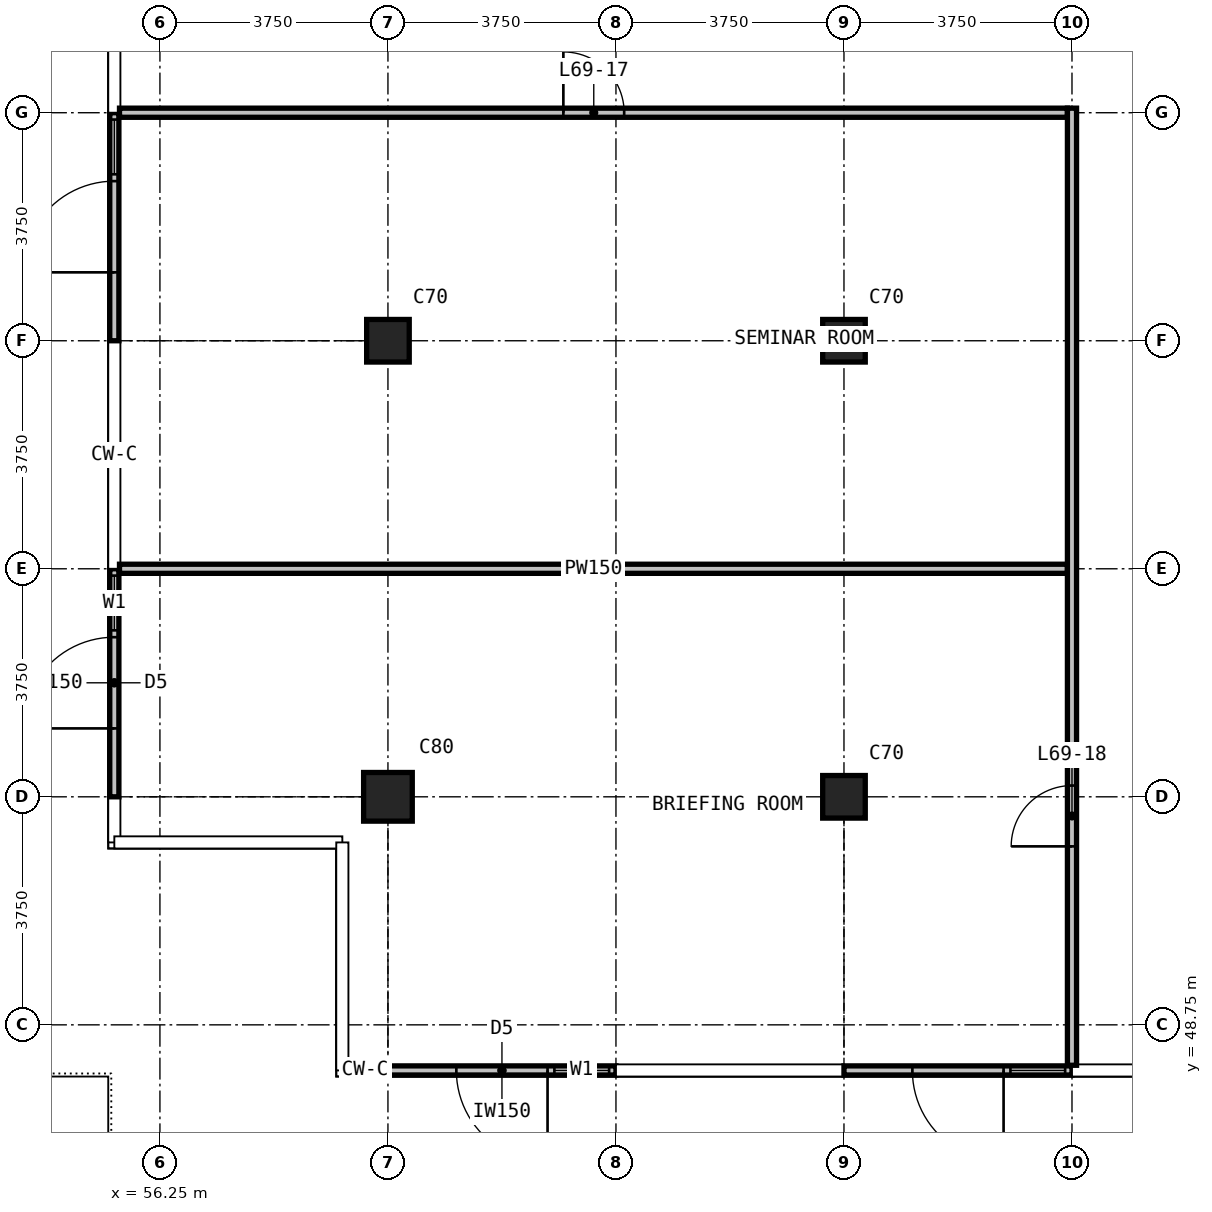
"""IFC4 building model, lengths in metres.
Left out: names, types, materials, properties, quantities, classifications, styles, units other than length and angle.
Written with IfcOpenShell. Run it as: python <this file> out.ifc"""

import sys

from ifc_helpers import new_model, si_unit, direction, frame, frame_2d, origin, origin_2d, place, context, subcontext, project, spatial, rectangle, extrude, element, fill, save


model = new_model("IFC4")
c1 = context("Model", 3, precision=1e-05, world=origin(), true_north=direction((0.0, 1.0)))
c2 = subcontext(c1, "Body", "Model", "MODEL_VIEW")
j1 = project(units=[si_unit("LENGTHUNIT", "METRE"), si_unit("PLANEANGLEUNIT", "RADIAN")], contexts=[c1])
p1 = place(None, origin())
s1 = spatial("IfcSite", under=j1, at=p1, CompositionType="ELEMENT")
p2 = place(p1, origin())
s2 = spatial("IfcBuilding", under=s1, at=p2, CompositionType="ELEMENT")
p3 = place(p2, frame((0.0, 0.0, 265.7)))
s3 = spatial("IfcBuildingStorey", under=s2, at=p3, CompositionType="ELEMENT", Elevation=265.7)
p4 = place(p3, frame((60.0, 52.5, 0.0), z_axis=(0.0, 0.0, 1.0), x_axis=(1.0, 0.0, 0.0)))
e1 = element("IfcColumn", 1, at=p4, inside=s3, PredefinedType="COLUMN", context=c2, shape_type="SweptSolid", body=[
    extrude(rectangle(XDim=0.8, YDim=0.8, at=origin_2d()), origin(), (0.0, 0.0, 1.0), 3.6),
])
for number, where, z_axis, x_axis in (
    (2, (60.0, 60.0, 0.0), (0.0, 0.0, 1.0), (1.0, 0.0, 0.0)),
    (3, (67.5, 52.5, 0.0), (0.0, 0.0, 1.0), (1.0, 0.0, 0.0)),
    (4, (67.5, 60.0, 0.0), (0.0, 0.0, 1.0), (1.0, 0.0, 0.0)),
):
    element("IfcColumn", number, at=place(p3, frame(where, z_axis=z_axis, x_axis=x_axis)), inside=s3, PredefinedType="COLUMN", context=c2, shape_type="SweptSolid", body=[
        extrude(rectangle(XDim=0.7, YDim=0.7, at=origin_2d()), origin(), (0.0, 0.0, 1.0), 3.6),
    ])
p5 = place(p3, frame((55.5, 52.5, 0.0), z_axis=(0.0, 0.0, 1.0), x_axis=(0.0, 1.0, 0.0)))
e5 = element("IfcWall", 5, at=p5, inside=s3, PredefinedType="SOLIDWALL", context=c2, shape_type="SweptSolid", body=[
    extrude(rectangle(XDim=3.75, YDim=0.15, at=frame_2d((1.875, 0.0))), origin(), (0.0, 0.0, 1.0), 3.3),
])
p6 = place(p5, frame((1.125, 0.0, 0.0)))
e6 = element("IfcOpeningElement", 6, at=p6, cuts=e5, PredefinedType="OPENING", context=c2, shape_type="SweptSolid", body=[
    extrude(rectangle(XDim=1.5, YDim=2.4, at=frame_2d((0.75, 1.2))), frame((0.0, 0.085, 0.0), z_axis=(0.0, -1.0, 0.0), x_axis=(1.0, 0.0, 0.0)), (0.0, 0.0, 1.0), 0.17),
])
p7 = place(p5, frame((2.738, 0.0, 0.1)))
e7 = element("IfcOpeningElement", 7, at=p7, cuts=e5, PredefinedType="OPENING", context=c2, shape_type="SweptSolid", body=[
    extrude(rectangle(XDim=0.9, YDim=2.4, at=frame_2d((0.45, 1.2))), frame((0.0, 0.085, 0.0), z_axis=(0.0, -1.0, 0.0), x_axis=(1.0, 0.0, 0.0)), (0.0, 0.0, 1.0), 0.17),
])
p8 = place(p3, frame((55.5, 60.0, 0.0), z_axis=(0.0, 0.0, 1.0), x_axis=(0.0, 1.0, 0.0)))
e8 = element("IfcWall", 8, at=p8, inside=s3, PredefinedType="SOLIDWALL", context=c2, shape_type="SweptSolid", body=[
    extrude(rectangle(XDim=3.75, YDim=0.15, at=frame_2d((1.875, 0.0))), origin(), (0.0, 0.0, 1.0), 3.3),
])
p9 = place(p8, frame((1.125, 0.0, 0.0)))
e9 = element("IfcOpeningElement", 9, at=p9, cuts=e8, PredefinedType="OPENING", context=c2, shape_type="SweptSolid", body=[
    extrude(rectangle(XDim=1.5, YDim=2.4, at=frame_2d((0.75, 1.2))), frame((0.0, 0.085, 0.0), z_axis=(0.0, -1.0, 0.0), x_axis=(1.0, 0.0, 0.0)), (0.0, 0.0, 1.0), 0.17),
])
p10 = place(p8, frame((2.738, 0.0, 0.1)))
e10 = element("IfcOpeningElement", 10, at=p10, cuts=e8, PredefinedType="OPENING", context=c2, shape_type="SweptSolid", body=[
    extrude(rectangle(XDim=0.9, YDim=2.4, at=frame_2d((0.45, 1.2))), frame((0.0, 0.085, 0.0), z_axis=(0.0, -1.0, 0.0), x_axis=(1.0, 0.0, 0.0)), (0.0, 0.0, 1.0), 0.17),
])
p11 = place(p3, frame((63.75, 48.0, 0.0), z_axis=(0.0, 0.0, 1.0), x_axis=(-1.0, 0.0, 0.0)))
e11 = element("IfcWall", 11, at=p11, inside=s3, PredefinedType="SOLIDWALL", context=c2, shape_type="SweptSolid", body=[
    extrude(rectangle(XDim=3.75, YDim=0.15, at=frame_2d((1.875, 0.0))), origin(), (0.0, 0.0, 1.0), 3.3),
])
p12 = place(p11, frame((0.113, 0.0, 0.1)))
e12 = element("IfcOpeningElement", 12, at=p12, cuts=e11, PredefinedType="OPENING", context=c2, shape_type="SweptSolid", body=[
    extrude(rectangle(XDim=0.9, YDim=2.4, at=frame_2d((0.45, 1.2))), frame((0.0, 0.085, 0.0), z_axis=(0.0, -1.0, 0.0), x_axis=(1.0, 0.0, 0.0)), (0.0, 0.0, 1.0), 0.17),
])
p13 = place(p11, frame((1.125, 0.0, 0.0)))
e13 = element("IfcOpeningElement", 13, at=p13, cuts=e11, PredefinedType="OPENING", context=c2, shape_type="SweptSolid", body=[
    extrude(rectangle(XDim=1.5, YDim=2.4, at=frame_2d((0.75, 1.2))), frame((0.0, 0.085, 0.0), z_axis=(0.0, -1.0, 0.0), x_axis=(1.0, 0.0, 0.0)), (0.0, 0.0, 1.0), 0.17),
])
p14 = place(p3, frame((71.25, 48.0, 0.0), z_axis=(0.0, 0.0, 1.0), x_axis=(-1.0, 0.0, 0.0)))
e14 = element("IfcWall", 14, at=p14, inside=s3, PredefinedType="SOLIDWALL", context=c2, shape_type="SweptSolid", body=[
    extrude(rectangle(XDim=3.75, YDim=0.15, at=frame_2d((1.875, 0.0))), origin(), (0.0, 0.0, 1.0), 3.3),
])
p15 = place(p14, frame((0.113, 0.0, 0.1)))
e15 = element("IfcOpeningElement", 15, at=p15, cuts=e14, PredefinedType="OPENING", context=c2, shape_type="SweptSolid", body=[
    extrude(rectangle(XDim=0.9, YDim=2.4, at=frame_2d((0.45, 1.2))), frame((0.0, 0.085, 0.0), z_axis=(0.0, -1.0, 0.0), x_axis=(1.0, 0.0, 0.0)), (0.0, 0.0, 1.0), 0.17),
])
p16 = place(p14, frame((1.125, 0.0, 0.0)))
e16 = element("IfcOpeningElement", 16, at=p16, cuts=e14, PredefinedType="OPENING", context=c2, shape_type="SweptSolid", body=[
    extrude(rectangle(XDim=1.5, YDim=2.4, at=frame_2d((0.75, 1.2))), frame((0.0, 0.085, 0.0), z_axis=(0.0, -1.0, 0.0), x_axis=(1.0, 0.0, 0.0)), (0.0, 0.0, 1.0), 0.17),
])
p17 = place(p3, frame((55.585, 56.25, 0.0), z_axis=(0.0, 0.0, 1.0), x_axis=(1.0, 0.0, 0.0)))
e17 = element("IfcWall", 17, at=p17, inside=s3, PredefinedType="PARTITIONING", context=c2, shape_type="SweptSolid", body=[
    extrude(rectangle(XDim=15.59, YDim=0.15, at=frame_2d((7.795, 0.0))), origin(), (0.0, 0.0, 1.0), 3.3),
])
p18 = place(p3, frame((55.585, 63.75, 0.0), z_axis=(0.0, 0.0, 1.0), x_axis=(1.0, 0.0, 0.0)))
e18 = element("IfcWall", 18, at=p18, inside=s3, PredefinedType="PARTITIONING", context=c2, shape_type="SweptSolid", body=[
    extrude(rectangle(XDim=15.59, YDim=0.15, at=frame_2d((7.795, 0.0))), origin(), (0.0, 0.0, 1.0), 3.3),
])
p19 = place(p18, frame((7.3, 0.0, 0.0)))
e19 = element("IfcOpeningElement", 19, at=p19, cuts=e18, PredefinedType="OPENING", context=c2, shape_type="SweptSolid", body=[
    extrude(rectangle(XDim=1.0, YDim=2.2, at=frame_2d((0.5, 1.1))), frame((0.0, 0.085, 0.0), z_axis=(0.0, -1.0, 0.0), x_axis=(1.0, 0.0, 0.0)), (0.0, 0.0, 1.0), 0.17),
])
p20 = place(p3, frame((71.25, 48.085, 0.0), z_axis=(0.0, 0.0, 1.0), x_axis=(0.0, 1.0, 0.0)))
e20 = element("IfcWall", 20, at=p20, inside=s3, PredefinedType="PARTITIONING", context=c2, shape_type="SweptSolid", body=[
    extrude(rectangle(XDim=15.74, YDim=0.15, at=frame_2d((7.87, 0.0))), origin(), (0.0, 0.0, 1.0), 3.3),
])
p21 = place(p20, frame((3.6, 0.0, 0.0)))
e21 = element("IfcOpeningElement", 21, at=p21, cuts=e20, PredefinedType="OPENING", context=c2, shape_type="SweptSolid", body=[
    extrude(rectangle(XDim=1.0, YDim=2.2, at=frame_2d((0.5, 1.1))), frame((0.0, 0.085, 0.0), z_axis=(0.0, -1.0, 0.0), x_axis=(1.0, 0.0, 0.0)), (0.0, 0.0, 1.0), 0.17),
])
p22 = place(p6, origin())
e22 = element("IfcDoor", 22, at=p22, inside=s3, OperationType="DOUBLE_DOOR_SINGLE_SWING", PredefinedType="DOOR", context=c2, shape_type="SweptSolid", body=[
    extrude(rectangle(XDim=1.5, YDim=2.4, at=frame_2d((0.75, 1.2))), frame((0.0, 0.025, 0.0), z_axis=(0.0, -1.0, 0.0), x_axis=(1.0, 0.0, 0.0)), (0.0, 0.0, 1.0), 0.05),
])
fill(e6, e22)
p23 = place(p7, origin())
e23 = element("IfcWindow", 23, at=p23, inside=s3, PartitioningType="SINGLE_PANEL", PredefinedType="WINDOW", context=c2, shape_type="SweptSolid", body=[
    extrude(rectangle(XDim=0.9, YDim=2.4, at=frame_2d((0.45, 1.2))), frame((0.0, 0.03, 0.0), z_axis=(0.0, -1.0, 0.0), x_axis=(1.0, 0.0, 0.0)), (0.0, 0.0, 1.0), 0.06),
])
fill(e7, e23)
p24 = place(p9, origin())
e24 = element("IfcDoor", 24, at=p24, inside=s3, OperationType="DOUBLE_DOOR_SINGLE_SWING", PredefinedType="DOOR", context=c2, shape_type="SweptSolid", body=[
    extrude(rectangle(XDim=1.5, YDim=2.4, at=frame_2d((0.75, 1.2))), frame((0.0, 0.025, 0.0), z_axis=(0.0, -1.0, 0.0), x_axis=(1.0, 0.0, 0.0)), (0.0, 0.0, 1.0), 0.05),
])
fill(e9, e24)
p25 = place(p10, origin())
e25 = element("IfcWindow", 25, at=p25, inside=s3, PartitioningType="SINGLE_PANEL", PredefinedType="WINDOW", context=c2, shape_type="SweptSolid", body=[
    extrude(rectangle(XDim=0.9, YDim=2.4, at=frame_2d((0.45, 1.2))), frame((0.0, 0.03, 0.0), z_axis=(0.0, -1.0, 0.0), x_axis=(1.0, 0.0, 0.0)), (0.0, 0.0, 1.0), 0.06),
])
fill(e10, e25)
p26 = place(p12, origin())
e26 = element("IfcWindow", 26, at=p26, inside=s3, PartitioningType="SINGLE_PANEL", PredefinedType="WINDOW", context=c2, shape_type="SweptSolid", body=[
    extrude(rectangle(XDim=0.9, YDim=2.4, at=frame_2d((0.45, 1.2))), frame((0.0, 0.03, 0.0), z_axis=(0.0, -1.0, 0.0), x_axis=(1.0, 0.0, 0.0)), (0.0, 0.0, 1.0), 0.06),
])
fill(e12, e26)
p27 = place(p13, origin())
e27 = element("IfcDoor", 27, at=p27, inside=s3, OperationType="DOUBLE_DOOR_SINGLE_SWING", PredefinedType="DOOR", context=c2, shape_type="SweptSolid", body=[
    extrude(rectangle(XDim=1.5, YDim=2.4, at=frame_2d((0.75, 1.2))), frame((0.0, 0.025, 0.0), z_axis=(0.0, -1.0, 0.0), x_axis=(1.0, 0.0, 0.0)), (0.0, 0.0, 1.0), 0.05),
])
fill(e13, e27)
p28 = place(p15, origin())
e28 = element("IfcWindow", 28, at=p28, inside=s3, PartitioningType="SINGLE_PANEL", PredefinedType="WINDOW", context=c2, shape_type="SweptSolid", body=[
    extrude(rectangle(XDim=0.9, YDim=2.4, at=frame_2d((0.45, 1.2))), frame((0.0, 0.03, 0.0), z_axis=(0.0, -1.0, 0.0), x_axis=(1.0, 0.0, 0.0)), (0.0, 0.0, 1.0), 0.06),
])
fill(e15, e28)
p29 = place(p16, origin())
e29 = element("IfcDoor", 29, at=p29, inside=s3, OperationType="DOUBLE_DOOR_SINGLE_SWING", PredefinedType="DOOR", context=c2, shape_type="SweptSolid", body=[
    extrude(rectangle(XDim=1.5, YDim=2.4, at=frame_2d((0.75, 1.2))), frame((0.0, 0.025, 0.0), z_axis=(0.0, -1.0, 0.0), x_axis=(1.0, 0.0, 0.0)), (0.0, 0.0, 1.0), 0.05),
])
fill(e16, e29)
p30 = place(p19, origin())
e30 = element("IfcDoor", 30, at=p30, inside=s3, OperationType="SINGLE_SWING_LEFT", PredefinedType="DOOR", context=c2, shape_type="SweptSolid", body=[
    extrude(rectangle(XDim=1.0, YDim=2.2, at=frame_2d((0.5, 1.1))), frame((0.0, 0.025, 0.0), z_axis=(0.0, -1.0, 0.0), x_axis=(1.0, 0.0, 0.0)), (0.0, 0.0, 1.0), 0.05),
])
fill(e19, e30)
p31 = place(p21, origin())
e31 = element("IfcDoor", 31, at=p31, inside=s3, OperationType="SINGLE_SWING_LEFT", PredefinedType="DOOR", context=c2, shape_type="SweptSolid", body=[
    extrude(rectangle(XDim=1.0, YDim=2.2, at=frame_2d((0.5, 1.1))), frame((0.0, 0.025, 0.0), z_axis=(0.0, -1.0, 0.0), x_axis=(1.0, 0.0, 0.0)), (0.0, 0.0, 1.0), 0.05),
])
fill(e21, e31)
save(model, sys.argv[1])
